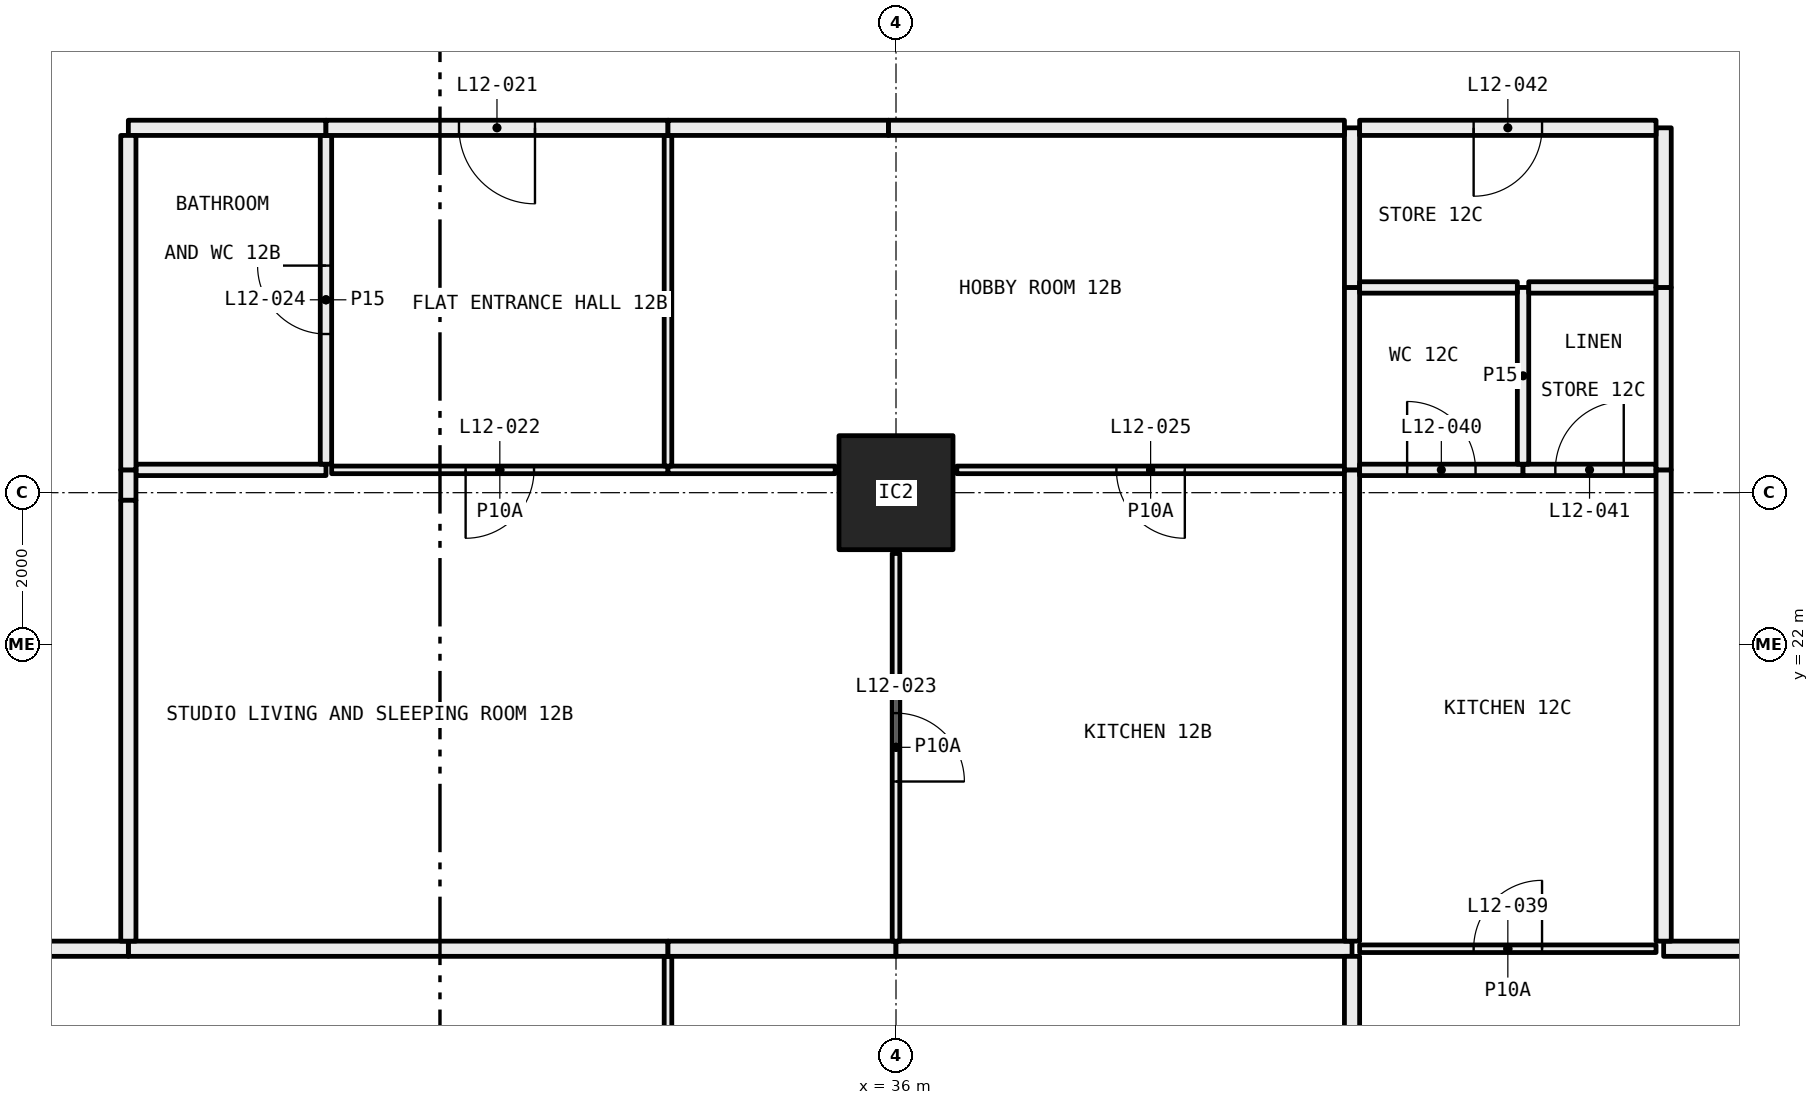
"""IFC4 building model, lengths in metres.
Left out: names, types, materials, properties, quantities, classifications, styles, units other than length and angle.
Written with IfcOpenShell. Run it as: python <this file> out.ifc"""

import sys

from ifc_helpers import new_model, si_unit, direction, frame, frame_2d, origin, origin_2d, place, context, subcontext, project, spatial, rectangle, hollow_rectangle, extrude, element, fill, save


model = new_model("IFC4")
c1 = context("Model", 3, precision=1e-05, world=origin(), true_north=direction((0.0, 1.0)))
c2 = subcontext(c1, "Body", "Model", "MODEL_VIEW")
j1 = project(units=[si_unit("LENGTHUNIT", "METRE"), si_unit("PLANEANGLEUNIT", "RADIAN")], contexts=[c1])
p1 = place(None, origin())
s1 = spatial("IfcSite", under=j1, at=p1, CompositionType="ELEMENT")
p2 = place(p1, origin())
s2 = spatial("IfcBuilding", under=s1, at=p2, CompositionType="ELEMENT")
p3 = place(p2, frame((0.0, 0.0, 54.15)))
s3 = spatial("IfcBuildingStorey", under=s2, at=p3, CompositionType="ELEMENT", Elevation=54.15)
p4 = place(p3, frame((36.0, 24.0, 0.0), z_axis=(0.0, 0.0, 1.0), x_axis=(1.0, 0.0, 0.0)))
e1 = element("IfcColumn", 1, at=p4, inside=s3, PredefinedType="COLUMN", context=c2, shape_type="SweptSolid", body=[
    extrude(hollow_rectangle(XDim=1.5, YDim=1.5, WallThickness=0.065, at=origin_2d()), origin(), (0.0, 0.0, 1.0), 3.05),
])
p5 = place(p3, frame((33.0, 12.05, 0.0), z_axis=(0.0, 0.0, 1.0), x_axis=(0.0, 1.0, 0.0)))
e2 = element("IfcWall", 2, at=p5, inside=s3, PredefinedType="PARTITIONING", context=c2, shape_type="SweptSolid", body=[
    extrude(rectangle(XDim=5.85, YDim=0.1, at=frame_2d((2.925, 0.0))), origin(), (0.0, 0.0, 1.0), 2.45),
])
p6 = place(p3, frame((33.0, 18.0, 0.0), z_axis=(0.0, 0.0, 1.0), x_axis=(-1.0, 0.0, 0.0)))
e3 = element("IfcWall", 3, at=p6, inside=s3, PredefinedType="PARTITIONING", context=c2, shape_type="SweptSolid", body=[
    extrude(rectangle(XDim=7.1, YDim=0.2, at=frame_2d((3.55, 0.0))), origin(), (0.0, 0.0, 1.0), 3.05),
])
p7 = place(p3, frame((25.9, 18.0, 0.0), z_axis=(0.0, 0.0, 1.0), x_axis=(-1.0, 0.0, 0.0)))
e4 = element("IfcWall", 4, at=p7, inside=s3, PredefinedType="PARTITIONING", context=c2, shape_type="SweptSolid", body=[
    extrude(rectangle(XDim=1.9, YDim=0.2, at=frame_2d((0.95, 0.0))), origin(), (0.0, 0.0, 1.0), 3.05),
])
p8 = place(p3, frame((36.0, 18.0, 0.0), z_axis=(0.0, 0.0, 1.0), x_axis=(-1.0, 0.0, 0.0)))
e5 = element("IfcWall", 5, at=p8, inside=s3, PredefinedType="PARTITIONING", context=c2, shape_type="SweptSolid", body=[
    extrude(rectangle(XDim=3.0, YDim=0.2, at=frame_2d((1.5, 0.0))), origin(), (0.0, 0.0, 1.0), 2.45),
])
p9 = place(p3, frame((42.0, 18.0, 0.0), z_axis=(0.0, 0.0, 1.0), x_axis=(-1.0, 0.0, 0.0)))
e6 = element("IfcWall", 6, at=p9, inside=s3, PredefinedType="PARTITIONING", context=c2, shape_type="SweptSolid", body=[
    extrude(rectangle(XDim=6.0, YDim=0.2, at=frame_2d((3.0, 0.0))), origin(), (0.0, 0.0, 1.0), 2.45),
])
p10 = place(p3, frame((42.0, 12.0, 0.0), z_axis=(0.0, 0.0, 1.0), x_axis=(0.0, 1.0, 0.0)))
e7 = element("IfcWall", 7, at=p10, inside=s3, PredefinedType="PARTITIONING", context=c2, shape_type="SweptSolid", body=[
    extrude(rectangle(XDim=5.9, YDim=0.2, at=frame_2d((2.95, 0.0))), origin(), (0.0, 0.0, 1.0), 2.45),
])
p11 = place(p3, frame((36.0, 18.1, 0.0), z_axis=(0.0, 0.0, 1.0), x_axis=(0.0, 1.0, 0.0)))
e8 = element("IfcWall", 8, at=p11, inside=s3, PredefinedType="PARTITIONING", context=c2, shape_type="SweptSolid", body=[
    extrude(rectangle(XDim=5.1, YDim=0.1, at=frame_2d((2.55, 0.0))), origin(), (0.0, 0.0, 1.0), 2.45),
])
p12 = place(p11, frame((2.1, 0.0, 0.0)))
e9 = element("IfcOpeningElement", 9, at=p12, cuts=e8, PredefinedType="OPENING", context=c2, shape_type="SweptSolid", body=[
    extrude(rectangle(XDim=0.9, YDim=2.1, at=frame_2d((0.45, 1.05))), frame((0.0, 0.06, 0.0), z_axis=(0.0, -1.0, 0.0), x_axis=(1.0, 0.0, 0.0)), (0.0, 0.0, 1.0), 0.12),
])
p13 = place(p3, frame((28.5, 24.3, 0.0), z_axis=(0.0, 0.0, 1.0), x_axis=(-1.0, 0.0, 0.0)))
e10 = element("IfcWall", 10, at=p13, inside=s3, PredefinedType="PARTITIONING", context=c2, shape_type="SweptSolid", body=[
    extrude(rectangle(XDim=2.5, YDim=0.15, at=frame_2d((1.25, 0.0))), origin(), (0.0, 0.0, 1.0), 3.05),
])
p14 = place(p3, frame((33.0, 24.3, 0.0), z_axis=(0.0, 0.0, 1.0), x_axis=(-1.0, 0.0, 0.0)))
e11 = element("IfcWall", 11, at=p14, inside=s3, PredefinedType="PARTITIONING", context=c2, shape_type="SweptSolid", body=[
    extrude(rectangle(XDim=4.425, YDim=0.1, at=frame_2d((2.212, 0.0))), origin(), (0.0, 0.0, 1.0), 3.05),
])
p15 = place(p14, frame((1.762, 0.0, 0.0)))
e12 = element("IfcOpeningElement", 12, at=p15, cuts=e11, PredefinedType="OPENING", context=c2, shape_type="SweptSolid", body=[
    extrude(rectangle(XDim=0.9, YDim=2.1, at=frame_2d((0.45, 1.05))), frame((0.0, 0.06, 0.0), z_axis=(0.0, -1.0, 0.0), x_axis=(1.0, 0.0, 0.0)), (0.0, 0.0, 1.0), 0.12),
])
p16 = place(p3, frame((35.2, 24.3, 0.0), z_axis=(0.0, 0.0, 1.0), x_axis=(-1.0, 0.0, 0.0)))
e13 = element("IfcWall", 13, at=p16, inside=s3, PredefinedType="PARTITIONING", context=c2, shape_type="SweptSolid", body=[
    extrude(rectangle(XDim=2.2, YDim=0.1, at=frame_2d((1.1, 0.0))), origin(), (0.0, 0.0, 1.0), 3.05),
])
p17 = place(p3, frame((25.9, 24.3, 0.0), z_axis=(0.0, 0.0, 1.0), x_axis=(0.0, -1.0, 0.0)))
e14 = element("IfcWall", 14, at=p17, inside=s3, PredefinedType="PARTITIONING", context=c2, shape_type="SweptSolid", body=[
    extrude(rectangle(XDim=0.4, YDim=0.2, at=frame_2d((0.2, 0.0))), origin(), (0.0, 0.0, 1.0), 2.45),
])
p18 = place(p3, frame((25.9, 23.9, 0.0), z_axis=(0.0, 0.0, 1.0), x_axis=(0.0, -1.0, 0.0)))
e15 = element("IfcWall", 15, at=p18, inside=s3, PredefinedType="PARTITIONING", context=c2, shape_type="SweptSolid", body=[
    extrude(rectangle(XDim=5.8, YDim=0.2, at=frame_2d((2.9, 0.0))), origin(), (0.0, 0.0, 1.0), 3.05),
])
p19 = place(p3, frame((41.9, 24.3, 0.0), z_axis=(0.0, 0.0, 1.0), x_axis=(-1.0, 0.0, 0.0)))
e16 = element("IfcWall", 16, at=p19, inside=s3, PredefinedType="PARTITIONING", context=c2, shape_type="SweptSolid", body=[
    extrude(rectangle(XDim=5.1, YDim=0.1, at=frame_2d((2.55, 0.0))), origin(), (0.0, 0.0, 1.0), 3.05),
])
p20 = place(p19, frame((2.1, 0.0, 0.0)))
e17 = element("IfcOpeningElement", 17, at=p20, cuts=e16, PredefinedType="OPENING", context=c2, shape_type="SweptSolid", body=[
    extrude(rectangle(XDim=0.9, YDim=2.1, at=frame_2d((0.45, 1.05))), frame((0.0, 0.06, 0.0), z_axis=(0.0, -1.0, 0.0), x_axis=(1.0, 0.0, 0.0)), (0.0, 0.0, 1.0), 0.12),
])
p21 = place(p3, frame((42.0, 18.1, 0.0), z_axis=(0.0, 0.0, 1.0), x_axis=(0.0, 1.0, 0.0)))
e18 = element("IfcWall", 18, at=p21, inside=s3, PredefinedType="PARTITIONING", context=c2, shape_type="SweptSolid", body=[
    extrude(rectangle(XDim=6.2, YDim=0.2, at=frame_2d((3.1, 0.0))), origin(), (0.0, 0.0, 1.0), 2.45),
])
p22 = place(p3, frame((28.5, 24.375, 0.0), z_axis=(0.0, 0.0, 1.0), x_axis=(0.0, 1.0, 0.0)))
e19 = element("IfcWall", 19, at=p22, inside=s3, PredefinedType="PARTITIONING", context=c2, shape_type="SweptSolid", body=[
    extrude(rectangle(XDim=4.325, YDim=0.15, at=frame_2d((2.163, 0.0))), origin(), (0.0, 0.0, 1.0), 3.05),
])
p23 = place(p22, frame((1.712, 0.0, 0.0)))
e20 = element("IfcOpeningElement", 20, at=p23, cuts=e19, PredefinedType="OPENING", context=c2, shape_type="SweptSolid", body=[
    extrude(rectangle(XDim=0.9, YDim=2.1, at=frame_2d((0.45, 1.05))), frame((0.0, 0.085, 0.0), z_axis=(0.0, -1.0, 0.0), x_axis=(1.0, 0.0, 0.0)), (0.0, 0.0, 1.0), 0.17),
])
p24 = place(p3, frame((28.5, 28.8, 0.0), z_axis=(0.0, 0.0, 1.0), x_axis=(-1.0, 0.0, 0.0)))
e21 = element("IfcWall", 21, at=p24, inside=s3, PredefinedType="PARTITIONING", context=c2, shape_type="SweptSolid", body=[
    extrude(rectangle(XDim=2.6, YDim=0.2, at=frame_2d((1.3, 0.0))), origin(), (0.0, 0.0, 1.0), 3.05),
])
p25 = place(p3, frame((25.9, 28.7, 0.0), z_axis=(0.0, 0.0, 1.0), x_axis=(0.0, -1.0, 0.0)))
e22 = element("IfcWall", 22, at=p25, inside=s3, PredefinedType="PARTITIONING", context=c2, shape_type="SweptSolid", body=[
    extrude(rectangle(XDim=4.4, YDim=0.2, at=frame_2d((2.2, 0.0))), origin(), (0.0, 0.0, 1.0), 3.05),
])
p26 = place(p3, frame((33.0, 24.35, 0.0), z_axis=(0.0, 0.0, 1.0), x_axis=(0.0, 1.0, 0.0)))
e23 = element("IfcWall", 23, at=p26, inside=s3, PredefinedType="PARTITIONING", context=c2, shape_type="SweptSolid", body=[
    extrude(rectangle(XDim=4.35, YDim=0.1, at=frame_2d((2.175, 0.0))), origin(), (0.0, 0.0, 1.0), 3.05),
])
p27 = place(p3, frame((33.0, 28.8, 0.0), z_axis=(0.0, 0.0, 1.0), x_axis=(-1.0, 0.0, 0.0)))
e24 = element("IfcWall", 24, at=p27, inside=s3, PredefinedType="PARTITIONING", context=c2, shape_type="SweptSolid", body=[
    extrude(rectangle(XDim=4.5, YDim=0.2, at=frame_2d((2.25, 0.0))), origin(), (0.0, 0.0, 1.0), 3.05),
])
p28 = place(p27, frame((1.75, 0.0, 0.0)))
e25 = element("IfcOpeningElement", 25, at=p28, cuts=e24, PredefinedType="OPENING", context=c2, shape_type="SweptSolid", body=[
    extrude(rectangle(XDim=1.0, YDim=2.1, at=frame_2d((0.5, 1.05))), frame((0.0, 0.11, 0.0), z_axis=(0.0, -1.0, 0.0), x_axis=(1.0, 0.0, 0.0)), (0.0, 0.0, 1.0), 0.22),
])
p29 = place(p3, frame((42.0, 24.3, 0.0), z_axis=(0.0, 0.0, 1.0), x_axis=(0.0, 1.0, 0.0)))
e26 = element("IfcWall", 26, at=p29, inside=s3, PredefinedType="PARTITIONING", context=c2, shape_type="SweptSolid", body=[
    extrude(rectangle(XDim=2.4, YDim=0.2, at=frame_2d((1.2, 0.0))), origin(), (0.0, 0.0, 1.0), 3.05),
])
p30 = place(p3, frame((42.0, 26.7, 0.0), z_axis=(0.0, 0.0, 1.0), x_axis=(0.0, 1.0, 0.0)))
e27 = element("IfcWall", 27, at=p30, inside=s3, PredefinedType="PARTITIONING", context=c2, shape_type="SweptSolid", body=[
    extrude(rectangle(XDim=2.1, YDim=0.2, at=frame_2d((1.05, 0.0))), origin(), (0.0, 0.0, 1.0), 3.05),
])
p31 = place(p3, frame((41.9, 28.8, 0.0), z_axis=(0.0, 0.0, 1.0), x_axis=(-1.0, 0.0, 0.0)))
e28 = element("IfcWall", 28, at=p31, inside=s3, PredefinedType="PARTITIONING", context=c2, shape_type="SweptSolid", body=[
    extrude(rectangle(XDim=6.0, YDim=0.2, at=frame_2d((3.0, 0.0))), origin(), (0.0, 0.0, 1.0), 2.45),
])
p32 = place(p3, frame((35.9, 28.8, 0.0), z_axis=(0.0, 0.0, 1.0), x_axis=(-1.0, 0.0, 0.0)))
e29 = element("IfcWall", 29, at=p32, inside=s3, PredefinedType="PARTITIONING", context=c2, shape_type="SweptSolid", body=[
    extrude(rectangle(XDim=2.9, YDim=0.2, at=frame_2d((1.45, 0.0))), origin(), (0.0, 0.0, 1.0), 3.05),
])
p33 = place(p3, frame((46.0, 18.0, 0.0), z_axis=(0.0, 0.0, 1.0), x_axis=(-1.0, 0.0, 0.0)))
e30 = element("IfcWall", 30, at=p33, inside=s3, PredefinedType="PARTITIONING", context=c2, shape_type="SweptSolid", body=[
    extrude(rectangle(XDim=3.9, YDim=0.1, at=frame_2d((1.95, 0.0))), origin(), (0.0, 0.0, 1.0), 3.05),
])
p34 = place(p33, frame((1.5, 0.0, 0.0)))
e31 = element("IfcOpeningElement", 31, at=p34, cuts=e30, PredefinedType="OPENING", context=c2, shape_type="SweptSolid", body=[
    extrude(rectangle(XDim=0.9, YDim=2.1, at=frame_2d((0.45, 1.05))), frame((0.0, 0.06, 0.0), z_axis=(0.0, -1.0, 0.0), x_axis=(1.0, 0.0, 0.0)), (0.0, 0.0, 1.0), 0.12),
])
p35 = place(p3, frame((52.5, 18.0, 0.0), z_axis=(0.0, 0.0, 1.0), x_axis=(-1.0, 0.0, 0.0)))
e32 = element("IfcWall", 32, at=p35, inside=s3, PredefinedType="PARTITIONING", context=c2, shape_type="SweptSolid", body=[
    extrude(rectangle(XDim=6.4, YDim=0.2, at=frame_2d((3.2, 0.0))), origin(), (0.0, 0.0, 1.0), 3.05),
])
p36 = place(p3, frame((44.25, 24.3, 0.0), z_axis=(0.0, 0.0, 1.0), x_axis=(-1.0, 0.0, 0.0)))
e33 = element("IfcWall", 33, at=p36, inside=s3, PredefinedType="PARTITIONING", context=c2, shape_type="SweptSolid", body=[
    extrude(rectangle(XDim=2.15, YDim=0.15, at=frame_2d((1.075, 0.0))), origin(), (0.0, 0.0, 1.0), 3.05),
])
p37 = place(p36, frame((0.625, 0.0, 0.0)))
e34 = element("IfcOpeningElement", 34, at=p37, cuts=e33, PredefinedType="OPENING", context=c2, shape_type="SweptSolid", body=[
    extrude(rectangle(XDim=0.9, YDim=2.1, at=frame_2d((0.45, 1.05))), frame((0.0, 0.085, 0.0), z_axis=(0.0, -1.0, 0.0), x_axis=(1.0, 0.0, 0.0)), (0.0, 0.0, 1.0), 0.17),
])
p38 = place(p3, frame((46.0, 24.3, 0.0), z_axis=(0.0, 0.0, 1.0), x_axis=(-1.0, 0.0, 0.0)))
e35 = element("IfcWall", 35, at=p38, inside=s3, PredefinedType="PARTITIONING", context=c2, shape_type="SweptSolid", body=[
    extrude(rectangle(XDim=1.75, YDim=0.15, at=frame_2d((0.875, 0.0))), origin(), (0.0, 0.0, 1.0), 3.05),
])
p39 = place(p38, frame((0.425, 0.0, 0.0)))
e36 = element("IfcOpeningElement", 36, at=p39, cuts=e35, PredefinedType="OPENING", context=c2, shape_type="SweptSolid", body=[
    extrude(rectangle(XDim=0.9, YDim=2.1, at=frame_2d((0.45, 1.05))), frame((0.0, 0.085, 0.0), z_axis=(0.0, -1.0, 0.0), x_axis=(1.0, 0.0, 0.0)), (0.0, 0.0, 1.0), 0.17),
])
p40 = place(p3, frame((46.1, 18.1, 0.0), z_axis=(0.0, 0.0, 1.0), x_axis=(0.0, 1.0, 0.0)))
e37 = element("IfcWall", 37, at=p40, inside=s3, PredefinedType="PARTITIONING", context=c2, shape_type="SweptSolid", body=[
    extrude(rectangle(XDim=6.2, YDim=0.2, at=frame_2d((3.1, 0.0))), origin(), (0.0, 0.0, 1.0), 2.45),
])
p41 = place(p3, frame((44.25, 24.375, 0.0), z_axis=(0.0, 0.0, 1.0), x_axis=(0.0, 1.0, 0.0)))
e38 = element("IfcWall", 38, at=p41, inside=s3, PredefinedType="PARTITIONING", context=c2, shape_type="SweptSolid", body=[
    extrude(rectangle(XDim=2.325, YDim=0.15, at=frame_2d((1.163, 0.0))), origin(), (0.0, 0.0, 1.0), 3.05),
])
p42 = place(p3, frame((44.175, 26.7, 0.0), z_axis=(0.0, 0.0, 1.0), x_axis=(-1.0, 0.0, 0.0)))
e39 = element("IfcWall", 39, at=p42, inside=s3, PredefinedType="PARTITIONING", context=c2, shape_type="SweptSolid", body=[
    extrude(rectangle(XDim=2.075, YDim=0.15, at=frame_2d((1.038, 0.0))), origin(), (0.0, 0.0, 1.0), 3.05),
])
p43 = place(p3, frame((46.0, 26.7, 0.0), z_axis=(0.0, 0.0, 1.0), x_axis=(-1.0, 0.0, 0.0)))
e40 = element("IfcWall", 40, at=p43, inside=s3, PredefinedType="PARTITIONING", context=c2, shape_type="SweptSolid", body=[
    extrude(rectangle(XDim=1.675, YDim=0.15, at=frame_2d((0.837, 0.0))), origin(), (0.0, 0.0, 1.0), 3.05),
])
p44 = place(p3, frame((46.1, 24.3, 0.0), z_axis=(0.0, 0.0, 1.0), x_axis=(0.0, 1.0, 0.0)))
e41 = element("IfcWall", 41, at=p44, inside=s3, PredefinedType="PARTITIONING", context=c2, shape_type="SweptSolid", body=[
    extrude(rectangle(XDim=2.4, YDim=0.2, at=frame_2d((1.2, 0.0))), origin(), (0.0, 0.0, 1.0), 3.05),
])
p45 = place(p3, frame((46.1, 26.7, 0.0), z_axis=(0.0, 0.0, 1.0), x_axis=(0.0, 1.0, 0.0)))
e42 = element("IfcWall", 42, at=p45, inside=s3, PredefinedType="PARTITIONING", context=c2, shape_type="SweptSolid", body=[
    extrude(rectangle(XDim=2.1, YDim=0.2, at=frame_2d((1.05, 0.0))), origin(), (0.0, 0.0, 1.0), 3.05),
])
p46 = place(p3, frame((46.0, 28.8, 0.0), z_axis=(0.0, 0.0, 1.0), x_axis=(-1.0, 0.0, 0.0)))
e43 = element("IfcWall", 43, at=p46, inside=s3, PredefinedType="PARTITIONING", context=c2, shape_type="SweptSolid", body=[
    extrude(rectangle(XDim=3.9, YDim=0.2, at=frame_2d((1.95, 0.0))), origin(), (0.0, 0.0, 1.0), 3.05),
])
p47 = place(p46, frame((1.5, 0.0, 0.0)))
e44 = element("IfcOpeningElement", 44, at=p47, cuts=e43, PredefinedType="OPENING", context=c2, shape_type="SweptSolid", body=[
    extrude(rectangle(XDim=0.9, YDim=2.1, at=frame_2d((0.45, 1.05))), frame((0.0, 0.11, 0.0), z_axis=(0.0, -1.0, 0.0), x_axis=(1.0, 0.0, 0.0)), (0.0, 0.0, 1.0), 0.22),
])
p48 = place(p28, origin())
e45 = element("IfcDoor", 45, at=p48, inside=s3, OperationType="SINGLE_SWING_RIGHT", PredefinedType="DOOR", context=c2, shape_type="SweptSolid", body=[
    extrude(rectangle(XDim=1.0, YDim=2.1, at=frame_2d((0.5, 1.05))), frame((0.0, 0.025, 0.0), z_axis=(0.0, -1.0, 0.0), x_axis=(1.0, 0.0, 0.0)), (0.0, 0.0, 1.0), 0.05),
])
fill(e25, e45)
p49 = place(p15, origin())
e46 = element("IfcDoor", 46, at=p49, inside=s3, OperationType="SINGLE_SWING_LEFT", PredefinedType="DOOR", context=c2, shape_type="SweptSolid", body=[
    extrude(rectangle(XDim=0.9, YDim=2.1, at=frame_2d((0.45, 1.05))), frame((0.0, 0.025, 0.0), z_axis=(0.0, -1.0, 0.0), x_axis=(1.0, 0.0, 0.0)), (0.0, 0.0, 1.0), 0.05),
])
fill(e12, e46)
p50 = place(p12, frame((0.9, 0.0, 0.0), x_axis=(-1.0, 0.0, 0.0)))
e47 = element("IfcDoor", 47, at=p50, inside=s3, OperationType="SINGLE_SWING_LEFT", PredefinedType="DOOR", context=c2, shape_type="SweptSolid", body=[
    extrude(rectangle(XDim=0.9, YDim=2.1, at=frame_2d((0.45, 1.05))), frame((0.0, 0.025, 0.0), z_axis=(0.0, -1.0, 0.0), x_axis=(1.0, 0.0, 0.0)), (0.0, 0.0, 1.0), 0.05),
])
fill(e9, e47)
p51 = place(p23, origin())
e48 = element("IfcDoor", 48, at=p51, inside=s3, OperationType="SINGLE_SWING_LEFT", PredefinedType="DOOR", context=c2, shape_type="SweptSolid", body=[
    extrude(rectangle(XDim=0.9, YDim=2.1, at=frame_2d((0.45, 1.05))), frame((0.0, 0.025, 0.0), z_axis=(0.0, -1.0, 0.0), x_axis=(1.0, 0.0, 0.0)), (0.0, 0.0, 1.0), 0.05),
])
fill(e20, e48)
p52 = place(p20, origin())
e49 = element("IfcDoor", 49, at=p52, inside=s3, OperationType="SINGLE_SWING_RIGHT", PredefinedType="DOOR", context=c2, shape_type="SweptSolid", body=[
    extrude(rectangle(XDim=0.9, YDim=2.1, at=frame_2d((0.45, 1.05))), frame((0.0, 0.025, 0.0), z_axis=(0.0, -1.0, 0.0), x_axis=(1.0, 0.0, 0.0)), (0.0, 0.0, 1.0), 0.05),
])
fill(e17, e49)
p53 = place(p34, frame((0.9, 0.0, 0.0), x_axis=(-1.0, 0.0, 0.0)))
e50 = element("IfcDoor", 50, at=p53, inside=s3, OperationType="SINGLE_SWING_LEFT", PredefinedType="DOOR", context=c2, shape_type="SweptSolid", body=[
    extrude(rectangle(XDim=0.9, YDim=2.1, at=frame_2d((0.45, 1.05))), frame((0.0, 0.025, 0.0), z_axis=(0.0, -1.0, 0.0), x_axis=(1.0, 0.0, 0.0)), (0.0, 0.0, 1.0), 0.05),
])
fill(e31, e50)
p54 = place(p37, frame((0.9, 0.0, 0.0), x_axis=(-1.0, 0.0, 0.0)))
e51 = element("IfcDoor", 51, at=p54, inside=s3, OperationType="SINGLE_SWING_RIGHT", PredefinedType="DOOR", context=c2, shape_type="SweptSolid", body=[
    extrude(rectangle(XDim=0.9, YDim=2.1, at=frame_2d((0.45, 1.05))), frame((0.0, 0.025, 0.0), z_axis=(0.0, -1.0, 0.0), x_axis=(1.0, 0.0, 0.0)), (0.0, 0.0, 1.0), 0.05),
])
fill(e34, e51)
p55 = place(p39, frame((0.9, 0.0, 0.0), x_axis=(-1.0, 0.0, 0.0)))
e52 = element("IfcDoor", 52, at=p55, inside=s3, OperationType="SINGLE_SWING_LEFT", PredefinedType="DOOR", context=c2, shape_type="SweptSolid", body=[
    extrude(rectangle(XDim=0.9, YDim=2.1, at=frame_2d((0.45, 1.05))), frame((0.0, 0.025, 0.0), z_axis=(0.0, -1.0, 0.0), x_axis=(1.0, 0.0, 0.0)), (0.0, 0.0, 1.0), 0.05),
])
fill(e36, e52)
p56 = place(p47, origin())
e53 = element("IfcDoor", 53, at=p56, inside=s3, OperationType="SINGLE_SWING_LEFT", PredefinedType="DOOR", context=c2, shape_type="SweptSolid", body=[
    extrude(rectangle(XDim=0.9, YDim=2.1, at=frame_2d((0.45, 1.05))), frame((0.0, 0.025, 0.0), z_axis=(0.0, -1.0, 0.0), x_axis=(1.0, 0.0, 0.0)), (0.0, 0.0, 1.0), 0.05),
])
fill(e44, e53)
save(model, sys.argv[1])
